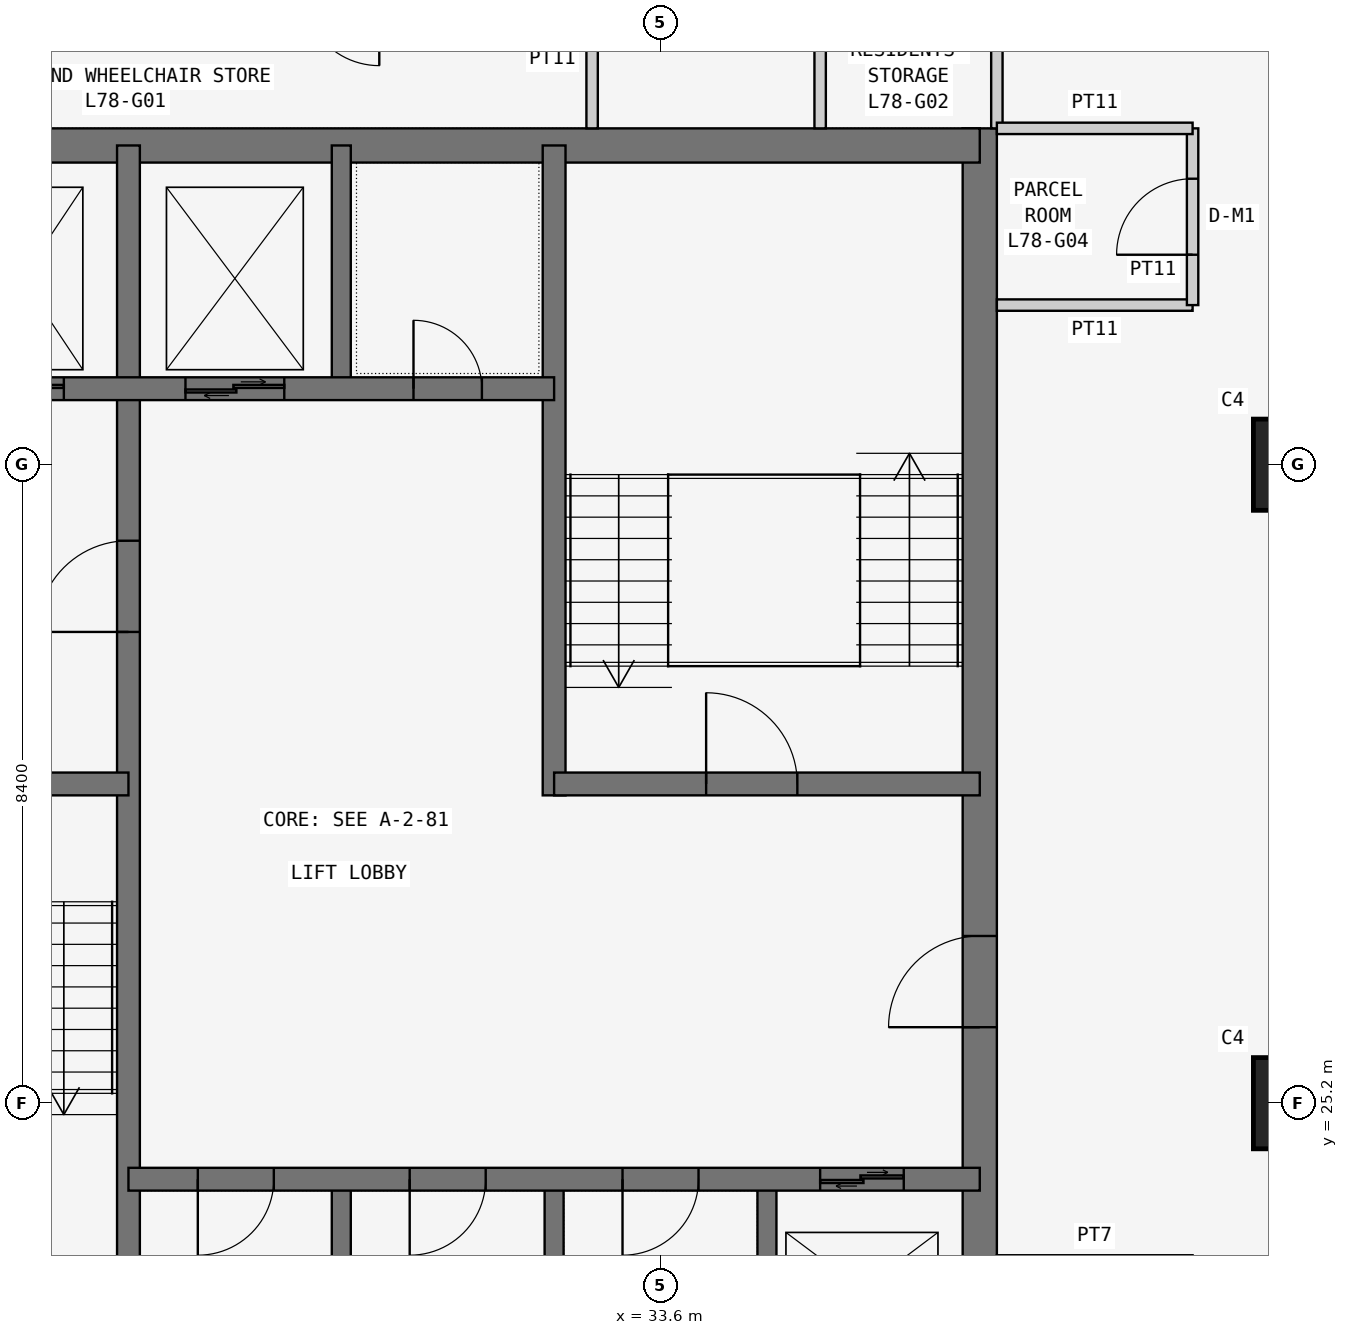
"""IFC4 building model, lengths in metres.
Left out: names, types, materials, properties, quantities, classifications, styles, units other than length and angle.
Written with IfcOpenShell. Run it as: python <this file> out.ifc"""

import sys

from ifc_helpers import new_model, si_unit, direction, frame, frame_2d, origin, origin_2d, place, context, subcontext, project, spatial, rectangle, extrude, element, fill, save


model = new_model("IFC4")
c1 = context("Model", 3, precision=1e-05, world=origin(), true_north=direction((0.0, 1.0)))
c2 = subcontext(c1, "Body", "Model", "MODEL_VIEW")
j1 = project(units=[si_unit("LENGTHUNIT", "METRE"), si_unit("PLANEANGLEUNIT", "RADIAN")], contexts=[c1])
p1 = place(None, origin())
s1 = spatial("IfcSite", under=j1, at=p1, CompositionType="ELEMENT")
p2 = place(p1, origin())
s2 = spatial("IfcBuilding", under=s1, at=p2, CompositionType="ELEMENT")
p3 = place(p2, frame((0.0, 0.0, 297.3)))
s3 = spatial("IfcBuildingStorey", under=s2, at=p3, CompositionType="ELEMENT", Elevation=297.3)
for number, where, z_axis, x_axis in (
    (1, (42.0, 25.2, 0.0), (0.0, 0.0, 1.0), (1.0, 0.0, 0.0)),
    (2, (42.0, 33.6, 0.0), (0.0, 0.0, 1.0), (1.0, 0.0, 0.0)),
):
    element("IfcColumn", number, at=place(p3, frame(where, z_axis=z_axis, x_axis=x_axis)), inside=s3, PredefinedType="COLUMN", context=c2, shape_type="SweptSolid", body=[
        extrude(rectangle(XDim=1.2, YDim=1.2, at=origin_2d()), origin(), (0.0, 0.0, 1.0), 3.6),
    ])
p4 = place(p3, frame((37.8, 21.0, 0.0), z_axis=(0.0, 0.0, 1.0), x_axis=(0.0, 1.0, 0.0)))
e3 = element("IfcWall", 3, at=p4, inside=s3, PredefinedType="SHEAR", context=c2, shape_type="SweptSolid", body=[
    extrude(rectangle(XDim=17.025, YDim=0.45, at=frame_2d((8.512, 0.0))), origin(), (0.0, 0.0, 1.0), 3.6),
])
p5 = place(p4, frame((5.2, 0.0, 0.0)))
e4 = element("IfcOpeningElement", 4, at=p5, cuts=e3, PredefinedType="OPENING", context=c2, shape_type="SweptSolid", body=[
    extrude(rectangle(XDim=1.2, YDim=2.1, at=frame_2d((0.6, 1.05))), frame((0.0, 0.235, 0.0), z_axis=(0.0, -1.0, 0.0), x_axis=(1.0, 0.0, 0.0)), (0.0, 0.0, 1.0), 0.47),
])
p6 = place(p3, frame((37.8, 37.8, 0.0), z_axis=(0.0, 0.0, 1.0), x_axis=(-1.0, 0.0, 0.0)))
e5 = element("IfcWall", 5, at=p6, inside=s3, PredefinedType="SHEAR", context=c2, shape_type="SweptSolid", body=[
    extrude(rectangle(XDim=17.025, YDim=0.45, at=frame_2d((8.513, 0.0))), origin(), (0.0, 0.0, 1.0), 3.6),
])
p7 = place(p3, frame((26.6, 21.0, 0.0), z_axis=(0.0, 0.0, 1.0), x_axis=(0.0, 1.0, 0.0)))
e6 = element("IfcWall", 6, at=p7, inside=s3, PredefinedType="SHEAR", context=c2, shape_type="SweptSolid", body=[
    extrude(rectangle(XDim=16.8, YDim=0.3, at=frame_2d((8.4, 0.0))), origin(), (0.0, 0.0, 1.0), 3.6),
])
p8 = place(p7, frame((10.4, 0.0, 0.0)))
e7 = element("IfcOpeningElement", 7, at=p8, cuts=e6, PredefinedType="OPENING", context=c2, shape_type="SweptSolid", body=[
    extrude(rectangle(XDim=1.2, YDim=2.1, at=frame_2d((0.6, 1.05))), frame((0.0, 0.16, 0.0), z_axis=(0.0, -1.0, 0.0), x_axis=(1.0, 0.0, 0.0)), (0.0, 0.0, 1.0), 0.32),
])
p9 = place(p3, frame((21.0, 29.4, 0.0), z_axis=(0.0, 0.0, 1.0), x_axis=(1.0, 0.0, 0.0)))
e8 = element("IfcWall", 8, at=p9, inside=s3, PredefinedType="SHEAR", context=c2, shape_type="SweptSolid", body=[
    extrude(rectangle(XDim=5.6, YDim=0.3, at=frame_2d((2.8, 0.0))), origin(), (0.0, 0.0, 1.0), 3.6),
])
p10 = place(p9, frame((2.3, 0.0, 0.0)))
e9 = element("IfcOpeningElement", 9, at=p10, cuts=e8, PredefinedType="OPENING", context=c2, shape_type="SweptSolid", body=[
    extrude(rectangle(XDim=1.2, YDim=2.1, at=frame_2d((0.6, 1.05))), frame((0.0, 0.16, 0.0), z_axis=(0.0, -1.0, 0.0), x_axis=(1.0, 0.0, 0.0)), (0.0, 0.0, 1.0), 0.32),
])
p11 = place(p3, frame((21.0, 34.6, 0.0), z_axis=(0.0, 0.0, 1.0), x_axis=(1.0, 0.0, 0.0)))
e10 = element("IfcWall", 10, at=p11, inside=s3, PredefinedType="SHEAR", context=c2, shape_type="SweptSolid", body=[
    extrude(rectangle(XDim=11.2, YDim=0.3, at=frame_2d((5.6, 0.0))), origin(), (0.0, 0.0, 1.0), 3.6),
])
p12 = place(p11, frame((9.35, 0.0, 0.0)))
e11 = element("IfcOpeningElement", 11, at=p12, cuts=e10, PredefinedType="OPENING", context=c2, shape_type="SweptSolid", body=[
    extrude(rectangle(XDim=0.9, YDim=2.1, at=frame_2d((0.45, 1.05))), frame((0.0, 0.16, 0.0), z_axis=(0.0, -1.0, 0.0), x_axis=(1.0, 0.0, 0.0)), (0.0, 0.0, 1.0), 0.32),
])
p13 = place(p11, frame((1.0, 0.0, 0.0)))
e12 = element("IfcOpeningElement", 12, at=p13, cuts=e10, PredefinedType="OPENING", context=c2, shape_type="SweptSolid", body=[
    extrude(rectangle(XDim=1.1, YDim=2.1, at=frame_2d((0.55, 1.05))), frame((0.0, 0.16, 0.0), z_axis=(0.0, -1.0, 0.0), x_axis=(1.0, 0.0, 0.0)), (0.0, 0.0, 1.0), 0.32),
])
p14 = place(p11, frame((3.65, 0.0, 0.0)))
e13 = element("IfcOpeningElement", 13, at=p14, cuts=e10, PredefinedType="OPENING", context=c2, shape_type="SweptSolid", body=[
    extrude(rectangle(XDim=1.1, YDim=2.1, at=frame_2d((0.55, 1.05))), frame((0.0, 0.16, 0.0), z_axis=(0.0, -1.0, 0.0), x_axis=(1.0, 0.0, 0.0)), (0.0, 0.0, 1.0), 0.32),
])
p15 = place(p11, frame((6.35, 0.0, 0.0)))
e14 = element("IfcOpeningElement", 14, at=p15, cuts=e10, PredefinedType="OPENING", context=c2, shape_type="SweptSolid", body=[
    extrude(rectangle(XDim=1.3, YDim=2.1, at=frame_2d((0.65, 1.05))), frame((0.0, 0.16, 0.0), z_axis=(0.0, -1.0, 0.0), x_axis=(1.0, 0.0, 0.0)), (0.0, 0.0, 1.0), 0.32),
])
p16 = place(p3, frame((26.6, 24.2, 0.0), z_axis=(0.0, 0.0, 1.0), x_axis=(1.0, 0.0, 0.0)))
e15 = element("IfcWall", 15, at=p16, inside=s3, PredefinedType="SHEAR", context=c2, shape_type="SweptSolid", body=[
    extrude(rectangle(XDim=11.2, YDim=0.3, at=frame_2d((5.6, 0.0))), origin(), (0.0, 0.0, 1.0), 3.6),
])
p17 = place(p16, frame((0.913, 0.0, 0.0)))
e16 = element("IfcOpeningElement", 16, at=p17, cuts=e15, PredefinedType="OPENING", context=c2, shape_type="SweptSolid", body=[
    extrude(rectangle(XDim=1.0, YDim=2.1, at=frame_2d((0.5, 1.05))), frame((0.0, 0.16, 0.0), z_axis=(0.0, -1.0, 0.0), x_axis=(1.0, 0.0, 0.0)), (0.0, 0.0, 1.0), 0.32),
])
p18 = place(p16, frame((3.7, 0.0, 0.0)))
e17 = element("IfcOpeningElement", 17, at=p18, cuts=e15, PredefinedType="OPENING", context=c2, shape_type="SweptSolid", body=[
    extrude(rectangle(XDim=1.0, YDim=2.1, at=frame_2d((0.5, 1.05))), frame((0.0, 0.16, 0.0), z_axis=(0.0, -1.0, 0.0), x_axis=(1.0, 0.0, 0.0)), (0.0, 0.0, 1.0), 0.32),
])
p19 = place(p16, frame((6.5, 0.0, 0.0)))
e18 = element("IfcOpeningElement", 18, at=p19, cuts=e15, PredefinedType="OPENING", context=c2, shape_type="SweptSolid", body=[
    extrude(rectangle(XDim=1.0, YDim=2.1, at=frame_2d((0.5, 1.05))), frame((0.0, 0.16, 0.0), z_axis=(0.0, -1.0, 0.0), x_axis=(1.0, 0.0, 0.0)), (0.0, 0.0, 1.0), 0.32),
])
p20 = place(p16, frame((9.1, 0.0, 0.0)))
e19 = element("IfcOpeningElement", 19, at=p20, cuts=e15, PredefinedType="OPENING", context=c2, shape_type="SweptSolid", body=[
    extrude(rectangle(XDim=1.1, YDim=2.1, at=frame_2d((0.55, 1.05))), frame((0.0, 0.16, 0.0), z_axis=(0.0, -1.0, 0.0), x_axis=(1.0, 0.0, 0.0)), (0.0, 0.0, 1.0), 0.32),
])
p21 = place(p3, frame((32.2, 29.25, 0.0), z_axis=(0.0, 0.0, 1.0), x_axis=(0.0, 1.0, 0.0)))
e20 = element("IfcWall", 20, at=p21, inside=s3, PredefinedType="SHEAR", context=c2, shape_type="SweptSolid", body=[
    extrude(rectangle(XDim=8.55, YDim=0.3, at=frame_2d((4.275, 0.0))), origin(), (0.0, 0.0, 1.0), 3.6),
])
p22 = place(p3, frame((32.2, 29.4, 0.0), z_axis=(0.0, 0.0, 1.0), x_axis=(1.0, 0.0, 0.0)))
e21 = element("IfcWall", 21, at=p22, inside=s3, PredefinedType="SHEAR", context=c2, shape_type="SweptSolid", body=[
    extrude(rectangle(XDim=5.6, YDim=0.3, at=frame_2d((2.8, 0.0))), origin(), (0.0, 0.0, 1.0), 3.6),
])
p23 = place(p22, frame((2.0, 0.0, 0.0)))
e22 = element("IfcOpeningElement", 22, at=p23, cuts=e21, PredefinedType="OPENING", context=c2, shape_type="SweptSolid", body=[
    extrude(rectangle(XDim=1.2, YDim=2.1, at=frame_2d((0.6, 1.05))), frame((0.0, 0.16, 0.0), z_axis=(0.0, -1.0, 0.0), x_axis=(1.0, 0.0, 0.0)), (0.0, 0.0, 1.0), 0.32),
])
for number, where, z_axis, x_axis in (
    (23, (29.4, 21.0, 0.0), (0.0, 0.0, 1.0), (0.0, 1.0, 0.0)),
    (24, (32.2, 21.0, 0.0), (0.0, 0.0, 1.0), (0.0, 1.0, 0.0)),
    (25, (35.0, 21.0, 0.0), (0.0, 0.0, 1.0), (0.0, 1.0, 0.0)),
    (26, (29.4, 34.6, 0.0), (0.0, 0.0, 1.0), (0.0, 1.0, 0.0)),
):
    element("IfcWall", number, at=place(p3, frame(where, z_axis=z_axis, x_axis=x_axis)), inside=s3, PredefinedType="SHEAR", context=c2, shape_type="SweptSolid", body=[
        extrude(rectangle(XDim=3.2, YDim=0.25, at=frame_2d((1.6, 0.0))), origin(), (0.0, 0.0, 1.0), 3.6),
    ])
p24 = place(p3, frame((32.7, 38.025, 0.0), z_axis=(0.0, 0.0, 1.0), x_axis=(0.0, 1.0, 0.0)))
e27 = element("IfcWall", 27, at=p24, inside=s3, PredefinedType="PARTITIONING", context=c2, shape_type="SweptSolid", body=[
    extrude(rectangle(XDim=1.825, YDim=0.15, at=frame_2d((0.913, 0.0))), origin(), (0.0, 0.0, 1.0), 3.35),
])
for number, where, z_axis, x_axis in (
    (28, (38.025, 38.025, 0.0), (0.0, 0.0, 1.0), (0.0, 1.0, 0.0)),
    (29, (35.7, 40.6, 0.0), (0.0, 0.0, 1.0), (0.0, -1.0, 0.0)),
):
    element("IfcWall", number, at=place(p3, frame(where, z_axis=z_axis, x_axis=x_axis)), inside=s3, PredefinedType="PARTITIONING", context=c2, shape_type="SweptSolid", body=[
        extrude(rectangle(XDim=2.575, YDim=0.15, at=frame_2d((1.288, 0.0))), origin(), (0.0, 0.0, 1.0), 3.35),
    ])
p25 = place(p3, frame((40.6, 23.1, 0.0), z_axis=(0.0, 0.0, 1.0), x_axis=(-1.0, 0.0, 0.0)))
e30 = element("IfcWall", 30, at=p25, inside=s3, PredefinedType="PARTITIONING", context=c2, shape_type="SweptSolid", body=[
    extrude(rectangle(XDim=2.575, YDim=0.2, at=frame_2d((1.288, 0.0))), origin(), (0.0, 0.0, 1.0), 3.35),
])
p26 = place(p3, frame((38.025, 35.7, 0.0), z_axis=(0.0, 0.0, 1.0), x_axis=(1.0, 0.0, 0.0)))
e31 = element("IfcWall", 31, at=p26, inside=s3, PredefinedType="PARTITIONING", context=c2, shape_type="SweptSolid", body=[
    extrude(rectangle(XDim=2.575, YDim=0.15, at=frame_2d((1.288, 0.0))), origin(), (0.0, 0.0, 1.0), 3.35),
])
p27 = place(p3, frame((40.6, 35.7, 0.0), z_axis=(0.0, 0.0, 1.0), x_axis=(0.0, 1.0, 0.0)))
e32 = element("IfcWall", 32, at=p27, inside=s3, PredefinedType="PARTITIONING", context=c2, shape_type="SweptSolid", body=[
    extrude(rectangle(XDim=2.325, YDim=0.15, at=frame_2d((1.163, 0.0))), origin(), (0.0, 0.0, 1.0), 3.35),
])
p28 = place(p27, frame((0.663, 0.0, 0.0)))
e33 = element("IfcOpeningElement", 33, at=p28, cuts=e32, PredefinedType="OPENING", context=c2, shape_type="SweptSolid", body=[
    extrude(rectangle(XDim=1.0, YDim=2.1, at=frame_2d((0.5, 1.05))), frame((0.0, 0.085, 0.0), z_axis=(0.0, -1.0, 0.0), x_axis=(1.0, 0.0, 0.0)), (0.0, 0.0, 1.0), 0.17),
])
p29 = place(p3, frame((40.6, 38.025, 0.0), z_axis=(0.0, 0.0, 1.0), x_axis=(-1.0, 0.0, 0.0)))
e34 = element("IfcWall", 34, at=p29, inside=s3, PredefinedType="PARTITIONING", context=c2, shape_type="SweptSolid", body=[
    extrude(rectangle(XDim=2.575, YDim=0.15, at=frame_2d((1.288, 0.0))), origin(), (0.0, 0.0, 1.0), 3.35),
])
p30 = place(p28, origin())
e35 = element("IfcDoor", 35, at=p30, inside=s3, OperationType="SINGLE_SWING_LEFT", PredefinedType="DOOR", context=c2, shape_type="SweptSolid", body=[
    extrude(rectangle(XDim=1.0, YDim=2.1, at=frame_2d((0.5, 1.05))), frame((0.0, 0.025, 0.0), z_axis=(0.0, -1.0, 0.0), x_axis=(1.0, 0.0, 0.0)), (0.0, 0.0, 1.0), 0.05),
])
fill(e33, e35)
p31 = place(p8, origin())
e36 = element("IfcDoor", 36, at=p31, inside=s3, OperationType="SINGLE_SWING_LEFT", PredefinedType="DOOR", context=c2, shape_type="SweptSolid", body=[
    extrude(rectangle(XDim=1.2, YDim=2.1, at=frame_2d((0.6, 1.05))), frame((0.0, 0.025, 0.0), z_axis=(0.0, -1.0, 0.0), x_axis=(1.0, 0.0, 0.0)), (0.0, 0.0, 1.0), 0.05),
])
fill(e7, e36)
p32 = place(p5, origin())
e37 = element("IfcDoor", 37, at=p32, inside=s3, OperationType="SINGLE_SWING_LEFT", PredefinedType="DOOR", context=c2, shape_type="SweptSolid", body=[
    extrude(rectangle(XDim=1.2, YDim=2.1, at=frame_2d((0.6, 1.05))), frame((0.0, 0.025, 0.0), z_axis=(0.0, -1.0, 0.0), x_axis=(1.0, 0.0, 0.0)), (0.0, 0.0, 1.0), 0.05),
])
fill(e4, e37)
p33 = place(p23, origin())
e38 = element("IfcDoor", 38, at=p33, inside=s3, OperationType="SINGLE_SWING_LEFT", PredefinedType="DOOR", context=c2, shape_type="SweptSolid", body=[
    extrude(rectangle(XDim=1.2, YDim=2.1, at=frame_2d((0.6, 1.05))), frame((0.0, 0.025, 0.0), z_axis=(0.0, -1.0, 0.0), x_axis=(1.0, 0.0, 0.0)), (0.0, 0.0, 1.0), 0.05),
])
fill(e22, e38)
p34 = place(p12, origin())
e39 = element("IfcDoor", 39, at=p34, inside=s3, OperationType="SINGLE_SWING_LEFT", PredefinedType="DOOR", context=c2, shape_type="SweptSolid", body=[
    extrude(rectangle(XDim=0.9, YDim=2.1, at=frame_2d((0.45, 1.05))), frame((0.0, 0.025, 0.0), z_axis=(0.0, -1.0, 0.0), x_axis=(1.0, 0.0, 0.0)), (0.0, 0.0, 1.0), 0.05),
])
fill(e11, e39)
p35 = place(p17, frame((1.0, 0.0, 0.0), z_axis=(0.0, 0.0, 1.0), x_axis=(-1.0, 0.0, 0.0)))
e40 = element("IfcDoor", 40, at=p35, inside=s3, OperationType="SINGLE_SWING_RIGHT", PredefinedType="DOOR", context=c2, shape_type="SweptSolid", body=[
    extrude(rectangle(XDim=1.0, YDim=2.1, at=frame_2d((0.5, 1.05))), frame((0.0, 0.025, 0.0), z_axis=(0.0, -1.0, 0.0), x_axis=(1.0, 0.0, 0.0)), (0.0, 0.0, 1.0), 0.05),
])
fill(e16, e40)
p36 = place(p18, frame((1.0, 0.0, 0.0), z_axis=(0.0, 0.0, 1.0), x_axis=(-1.0, 0.0, 0.0)))
e41 = element("IfcDoor", 41, at=p36, inside=s3, OperationType="SINGLE_SWING_RIGHT", PredefinedType="DOOR", context=c2, shape_type="SweptSolid", body=[
    extrude(rectangle(XDim=1.0, YDim=2.1, at=frame_2d((0.5, 1.05))), frame((0.0, 0.025, 0.0), z_axis=(0.0, -1.0, 0.0), x_axis=(1.0, 0.0, 0.0)), (0.0, 0.0, 1.0), 0.05),
])
fill(e17, e41)
p37 = place(p19, frame((1.0, 0.0, 0.0), z_axis=(0.0, 0.0, 1.0), x_axis=(-1.0, 0.0, 0.0)))
e42 = element("IfcDoor", 42, at=p37, inside=s3, OperationType="SINGLE_SWING_RIGHT", PredefinedType="DOOR", context=c2, shape_type="SweptSolid", body=[
    extrude(rectangle(XDim=1.0, YDim=2.1, at=frame_2d((0.5, 1.05))), frame((0.0, 0.025, 0.0), z_axis=(0.0, -1.0, 0.0), x_axis=(1.0, 0.0, 0.0)), (0.0, 0.0, 1.0), 0.05),
])
fill(e18, e42)
p38 = place(p20, origin())
e43 = element("IfcDoor", 43, at=p38, inside=s3, OperationType="DOUBLE_DOOR_SLIDING", PredefinedType="DOOR", context=c2, shape_type="SweptSolid", body=[
    extrude(rectangle(XDim=1.1, YDim=2.1, at=frame_2d((0.55, 1.05))), frame((0.0, 0.025, 0.0), z_axis=(0.0, -1.0, 0.0), x_axis=(1.0, 0.0, 0.0)), (0.0, 0.0, 1.0), 0.05),
])
fill(e19, e43)
p39 = place(p14, origin())
e44 = element("IfcDoor", 44, at=p39, inside=s3, OperationType="DOUBLE_DOOR_SLIDING", PredefinedType="DOOR", context=c2, shape_type="SweptSolid", body=[
    extrude(rectangle(XDim=1.1, YDim=2.1, at=frame_2d((0.55, 1.05))), frame((0.0, 0.025, 0.0), z_axis=(0.0, -1.0, 0.0), x_axis=(1.0, 0.0, 0.0)), (0.0, 0.0, 1.0), 0.05),
])
fill(e13, e44)
p40 = place(p15, origin())
e45 = element("IfcDoor", 45, at=p40, inside=s3, OperationType="DOUBLE_DOOR_SLIDING", PredefinedType="DOOR", context=c2, shape_type="SweptSolid", body=[
    extrude(rectangle(XDim=1.3, YDim=2.1, at=frame_2d((0.65, 1.05))), frame((0.0, 0.025, 0.0), z_axis=(0.0, -1.0, 0.0), x_axis=(1.0, 0.0, 0.0)), (0.0, 0.0, 1.0), 0.05),
])
fill(e14, e45)
save(model, sys.argv[1])
